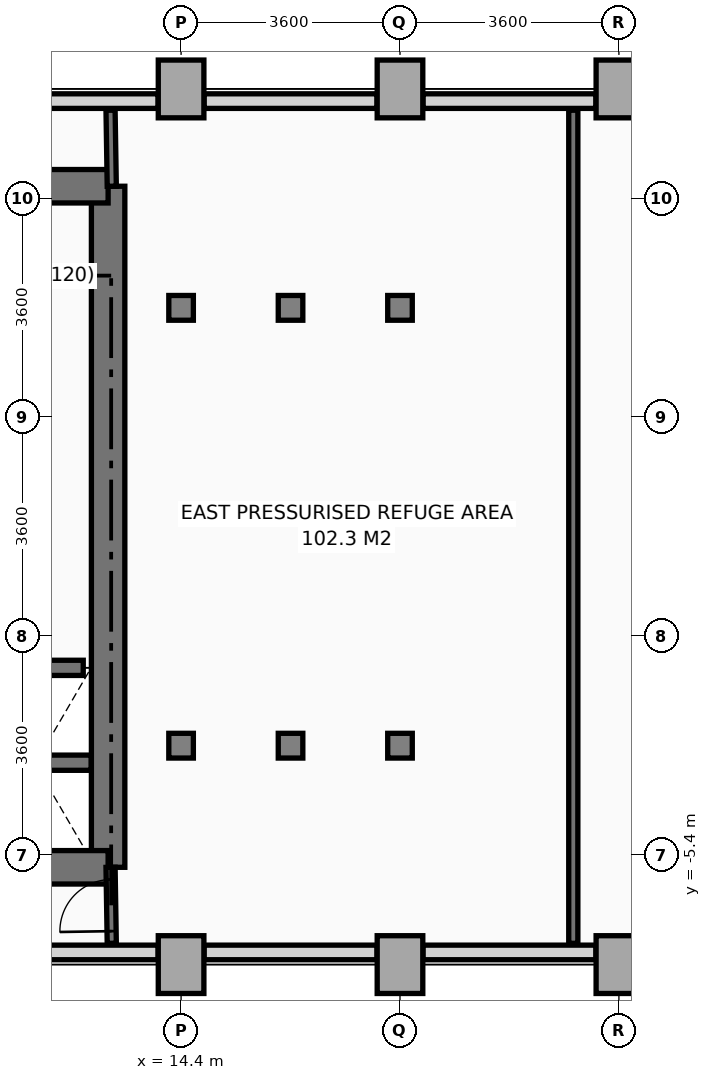
"""IFC4 building model, lengths in metres.
Left out: names, types, materials, properties, quantities, classifications, styles, units other than length and angle.
Written with IfcOpenShell. Run it as: python <this file> out.ifc"""

import sys

from ifc_helpers import new_model, si_unit, direction, frame, frame_2d, origin, origin_2d, place, context, subcontext, project, spatial, rectangle, i_section, extrude, source, transform, mapped, element, fill, save


model = new_model("IFC4")
c1 = context("Model", 3, precision=1e-05, world=origin(), true_north=direction((0.0, 1.0)))
c2 = subcontext(c1, "Body", "Model", "MODEL_VIEW")
j1 = project(units=[si_unit("LENGTHUNIT", "METRE"), si_unit("PLANEANGLEUNIT", "RADIAN")], contexts=[c1])
p1 = place(None, origin())
s1 = spatial("IfcSite", under=j1, at=p1, CompositionType="ELEMENT")
p2 = place(p1, origin())
s2 = spatial("IfcBuilding", under=s1, at=p2, CompositionType="ELEMENT")
p3 = place(p2, frame((0.0, 0.0, 88.4)))
s3 = spatial("IfcBuildingStorey", under=s2, at=p3, CompositionType="ELEMENT", Elevation=88.4)
m1 = source(origin(), c2, "Body", "SweptSolid", [
    extrude(rectangle(XDim=0.75, YDim=0.95, at=origin_2d()), origin(), (0.0, 0.0, 1.0), 4.4),
])
p4 = place(p3, frame((14.4, -7.2, 0.0), z_axis=(0.0, 0.0, 1.0), x_axis=(1.0, 0.0, 0.0)))
e1 = element("IfcColumn", 1, at=p4, inside=s3, PredefinedType="COLUMN", context=c2, shape_type="MappedRepresentation", body=[
    mapped(m1, transform((0.0, 0.0, 0.0), x_axis=(1.0, 0.0, 0.0), y_axis=(0.0, 1.0, 0.0), z_axis=(0.0, 0.0, 1.0), scale=1.0)),
])
m2 = source(origin(), c2, "Body", "SweptSolid", [
    extrude(i_section(OverallWidth=0.404, OverallDepth=0.407, WebThickness=0.022, FlangeThickness=0.035, at=origin_2d()), origin(), (0.0, 0.0, 1.0), 4.4),
])
for number, where, z_axis, x_axis in (
    (2, (14.4, -3.6, 0.0), (0.0, 0.0, 1.0), (1.0, 0.0, 0.0)),
    (3, (14.4, 3.6, 0.0), (0.0, 0.0, 1.0), (1.0, 0.0, 0.0)),
):
    element("IfcColumn", number, at=place(p3, frame(where, z_axis=z_axis, x_axis=x_axis)), inside=s3, PredefinedType="COLUMN", context=c2, shape_type="MappedRepresentation", body=[
        mapped(m2, transform((0.0, 0.0, 0.0), x_axis=(1.0, 0.0, 0.0), y_axis=(0.0, 1.0, 0.0), z_axis=(0.0, 0.0, 1.0), scale=1.0)),
    ])
p5 = place(p3, frame((14.4, 7.2, 0.0), z_axis=(0.0, 0.0, 1.0), x_axis=(1.0, 0.0, 0.0)))
e4 = element("IfcColumn", 4, at=p5, inside=s3, PredefinedType="COLUMN", context=c2, shape_type="MappedRepresentation", body=[
    mapped(m1, transform((0.0, 0.0, 0.0), x_axis=(1.0, 0.0, 0.0), y_axis=(0.0, 1.0, 0.0), z_axis=(0.0, 0.0, 1.0), scale=1.0)),
])
for number, where, z_axis, x_axis in (
    (5, (16.2, -3.6, 0.0), (0.0, 0.0, 1.0), (1.0, 0.0, 0.0)),
    (6, (16.2, 3.6, 0.0), (0.0, 0.0, 1.0), (1.0, 0.0, 0.0)),
):
    element("IfcColumn", number, at=place(p3, frame(where, z_axis=z_axis, x_axis=x_axis)), inside=s3, PredefinedType="COLUMN", context=c2, shape_type="MappedRepresentation", body=[
        mapped(m2, transform((0.0, 0.0, 0.0), x_axis=(1.0, 0.0, 0.0), y_axis=(0.0, 1.0, 0.0), z_axis=(0.0, 0.0, 1.0), scale=1.0)),
    ])
p6 = place(p3, frame((18.0, -7.2, 0.0), z_axis=(0.0, 0.0, 1.0), x_axis=(1.0, 0.0, 0.0)))
e7 = element("IfcColumn", 7, at=p6, inside=s3, PredefinedType="COLUMN", context=c2, shape_type="MappedRepresentation", body=[
    mapped(m1, transform((0.0, 0.0, 0.0), x_axis=(1.0, 0.0, 0.0), y_axis=(0.0, 1.0, 0.0), z_axis=(0.0, 0.0, 1.0), scale=1.0)),
])
for number, where, z_axis, x_axis in (
    (8, (18.0, -3.6, 0.0), (0.0, 0.0, 1.0), (1.0, 0.0, 0.0)),
    (9, (18.0, 3.6, 0.0), (0.0, 0.0, 1.0), (1.0, 0.0, 0.0)),
):
    element("IfcColumn", number, at=place(p3, frame(where, z_axis=z_axis, x_axis=x_axis)), inside=s3, PredefinedType="COLUMN", context=c2, shape_type="MappedRepresentation", body=[
        mapped(m2, transform((0.0, 0.0, 0.0), x_axis=(1.0, 0.0, 0.0), y_axis=(0.0, 1.0, 0.0), z_axis=(0.0, 0.0, 1.0), scale=1.0)),
    ])
for number, where, z_axis, x_axis in (
    (10, (18.0, 7.2, 0.0), (0.0, 0.0, 1.0), (1.0, 0.0, 0.0)),
    (11, (21.6, -7.2, 0.0), (0.0, 0.0, 1.0), (1.0, 0.0, 0.0)),
    (12, (21.6, 7.2, 0.0), (0.0, 0.0, 1.0), (1.0, 0.0, 0.0)),
):
    element("IfcColumn", number, at=place(p3, frame(where, z_axis=z_axis, x_axis=x_axis)), inside=s3, PredefinedType="COLUMN", context=c2, shape_type="MappedRepresentation", body=[
        mapped(m1, transform((0.0, 0.0, 0.0), x_axis=(1.0, 0.0, 0.0), y_axis=(0.0, 1.0, 0.0), z_axis=(0.0, 0.0, 1.0), scale=1.0)),
    ])
for number, where, z_axis, x_axis in (
    (13, (21.222, -7.0, 0.0), (0.0, 0.0, 1.0), (-1.0, 0.0, 0.0)),
    (14, (17.622, -7.0, 0.0), (0.0, 0.0, 1.0), (-1.0, 0.0, 0.0)),
):
    element("IfcWall", number, at=place(p3, frame(where, z_axis=z_axis, x_axis=x_axis)), inside=s3, PredefinedType="PARAPET", context=c2, shape_type="SweptSolid", body=[
        extrude(rectangle(XDim=2.844, YDim=0.24, at=frame_2d((1.422, 0.0))), origin(), (0.0, 0.0, 1.0), 1.15),
    ])
p7 = place(p3, frame((14.022, -7.0, 0.0), z_axis=(0.0, 0.0, 1.0), x_axis=(-1.0, 0.0, 0.0)))
e15 = element("IfcWall", 15, at=p7, inside=s3, PredefinedType="PARAPET", context=c2, shape_type="SweptSolid", body=[
    extrude(rectangle(XDim=4.822, YDim=0.24, at=frame_2d((2.411, 0.0))), origin(), (0.0, 0.0, 1.0), 1.15),
])
p8 = place(p3, frame((11.403, 7.0, 0.0), z_axis=(0.0, 0.0, 1.0), x_axis=(1.0, 0.0, 0.0)))
e16 = element("IfcWall", 16, at=p8, inside=s3, PredefinedType="PARAPET", context=c2, shape_type="SweptSolid", body=[
    extrude(rectangle(XDim=2.619, YDim=0.24, at=frame_2d((1.31, 0.0))), origin(), (0.0, 0.0, 1.0), 1.15),
])
for number, where, z_axis, x_axis in (
    (17, (14.778, 7.0, 0.0), (0.0, 0.0, 1.0), (1.0, 0.0, 0.0)),
    (18, (18.378, 7.0, 0.0), (0.0, 0.0, 1.0), (1.0, 0.0, 0.0)),
):
    element("IfcWall", number, at=place(p3, frame(where, z_axis=z_axis, x_axis=x_axis)), inside=s3, PredefinedType="PARAPET", context=c2, shape_type="SweptSolid", body=[
        extrude(rectangle(XDim=2.844, YDim=0.24, at=frame_2d((1.422, 0.0))), origin(), (0.0, 0.0, 1.0), 1.15),
    ])
p9 = place(p3, frame((13.2, -5.6, 0.0), z_axis=(0.0, 0.0, 1.0), x_axis=(0.0, 1.0, 0.0)))
e19 = element("IfcWall", 19, at=p9, inside=s3, PredefinedType="SHEAR", context=c2, shape_type="SweptSolid", body=[
    extrude(rectangle(XDim=11.2, YDim=0.55, at=frame_2d((5.6, 0.0))), origin(), (0.0, 0.0, 1.0), 4.4),
])
p10 = place(p3, frame((11.381, 5.6, 0.0), z_axis=(0.0, 0.0, 1.0), x_axis=(1.0, 0.0, 0.0)))
e20 = element("IfcWall", 20, at=p10, inside=s3, PredefinedType="SHEAR", context=c2, shape_type="SweptSolid", body=[
    extrude(rectangle(XDim=1.819, YDim=0.55, at=frame_2d((0.909, 0.0))), origin(), (0.0, 0.0, 1.0), 4.4),
])
p11 = place(p3, frame((5.4, -5.6, 0.0), z_axis=(0.0, 0.0, 1.0), x_axis=(1.0, 0.0, 0.0)))
e21 = element("IfcWall", 21, at=p11, inside=s3, PredefinedType="SHEAR", context=c2, shape_type="SweptSolid", body=[
    extrude(rectangle(XDim=7.8, YDim=0.55, at=frame_2d((3.9, 0.0))), origin(), (0.0, 0.0, 1.0), 4.4),
])
p12 = place(p11, frame((3.0, 0.0, 0.0)))
e22 = element("IfcOpeningElement", 22, at=p12, cuts=e21, PredefinedType="OPENING", context=c2, shape_type="SweptSolid", body=[
    extrude(rectangle(XDim=1.2, YDim=2.2, at=frame_2d((0.6, 1.1))), frame((0.0, 0.285, 0.0), z_axis=(0.0, -1.0, 0.0), x_axis=(1.0, 0.0, 0.0)), (0.0, 0.0, 1.0), 0.57),
])
p13 = place(p3, frame((11.08, -3.88, 0.0), z_axis=(0.0, 0.0, 1.0), x_axis=(1.0, 0.0, 0.0)))
e23 = element("IfcWall", 23, at=p13, inside=s3, PredefinedType="SOLIDWALL", context=c2, shape_type="SweptSolid", body=[
    extrude(rectangle(XDim=1.84, YDim=0.25, at=frame_2d((0.92, 0.0))), origin(), (0.0, 0.0, 1.0), 4.4),
])
p14 = place(p3, frame((11.209, -2.32, 0.0), z_axis=(0.0, 0.0, 1.0), x_axis=(1.0, 0.0, 0.0)))
e24 = element("IfcWall", 24, at=p14, inside=s3, PredefinedType="SOLIDWALL", context=c2, shape_type="SweptSolid", body=[
    extrude(rectangle(XDim=1.582, YDim=0.25, at=frame_2d((0.791, 0.0))), origin(), (0.0, 0.0, 1.0), 4.4),
])
p15 = place(p3, frame((13.26, -6.85, 0.0), z_axis=(0.0, 0.0, 1.0), x_axis=(-0.016013571389, 0.999871774545, 0.0)))
e25 = element("IfcWall", 25, at=p15, inside=s3, PredefinedType="PARTITIONING", context=c2, shape_type="SweptSolid", body=[
    extrude(rectangle(XDim=1.25, YDim=0.15, at=frame_2d((0.625, 0.0))), origin(), (0.0, 0.0, 1.0), 4.4),
])
p16 = place(p15, frame((0.2, 0.0, 0.0)))
e26 = element("IfcOpeningElement", 26, at=p16, cuts=e25, PredefinedType="OPENING", context=c2, shape_type="SweptSolid", body=[
    extrude(rectangle(XDim=0.85, YDim=2.1, at=frame_2d((0.425, 1.05))), frame((0.0, 0.085, 0.0), z_axis=(0.0, -1.0, 0.0), x_axis=(1.0, 0.0, 0.0)), (0.0, 0.0, 1.0), 0.17),
])
p17 = place(p3, frame((13.26, 5.6, 0.0), z_axis=(0.0, 0.0, 1.0), x_axis=(-0.016013571389, 0.999871774545, 0.0)))
e27 = element("IfcWall", 27, at=p17, inside=s3, PredefinedType="PARTITIONING", context=c2, shape_type="SweptSolid", body=[
    extrude(rectangle(XDim=1.25, YDim=0.15, at=frame_2d((0.625, 0.0))), origin(), (0.0, 0.0, 1.0), 4.4),
])
p18 = place(p3, frame((20.85, -6.85, 0.0), z_axis=(0.0, 0.0, 1.0), x_axis=(0.0, 1.0, 0.0)))
e28 = element("IfcWall", 28, at=p18, inside=s3, PredefinedType="PARTITIONING", context=c2, shape_type="SweptSolid", body=[
    extrude(rectangle(XDim=13.7, YDim=0.15, at=frame_2d((6.85, 0.0))), origin(), (0.0, 0.0, 1.0), 3.91),
])
m3 = source(origin(), c2, "Body", "SweptSolid", [
    extrude(rectangle(XDim=0.85, YDim=2.1, at=frame_2d((0.425, 1.05))), frame((0.0, 0.025, 0.0), z_axis=(0.0, -1.0, 0.0), x_axis=(1.0, 0.0, 0.0)), (0.0, 0.0, 1.0), 0.05),
])
p19 = place(p16, origin())
e29 = element("IfcDoor", 29, at=p19, inside=s3, OperationType="SINGLE_SWING_LEFT", PredefinedType="DOOR", context=c2, shape_type="MappedRepresentation", body=[
    mapped(m3, transform((0.0, 0.0, 0.0), x_axis=(1.0, 0.0, 0.0), y_axis=(0.0, 1.0, 0.0), z_axis=(0.0, 0.0, 1.0), scale=1.0)),
])
fill(e26, e29)
save(model, sys.argv[1])
